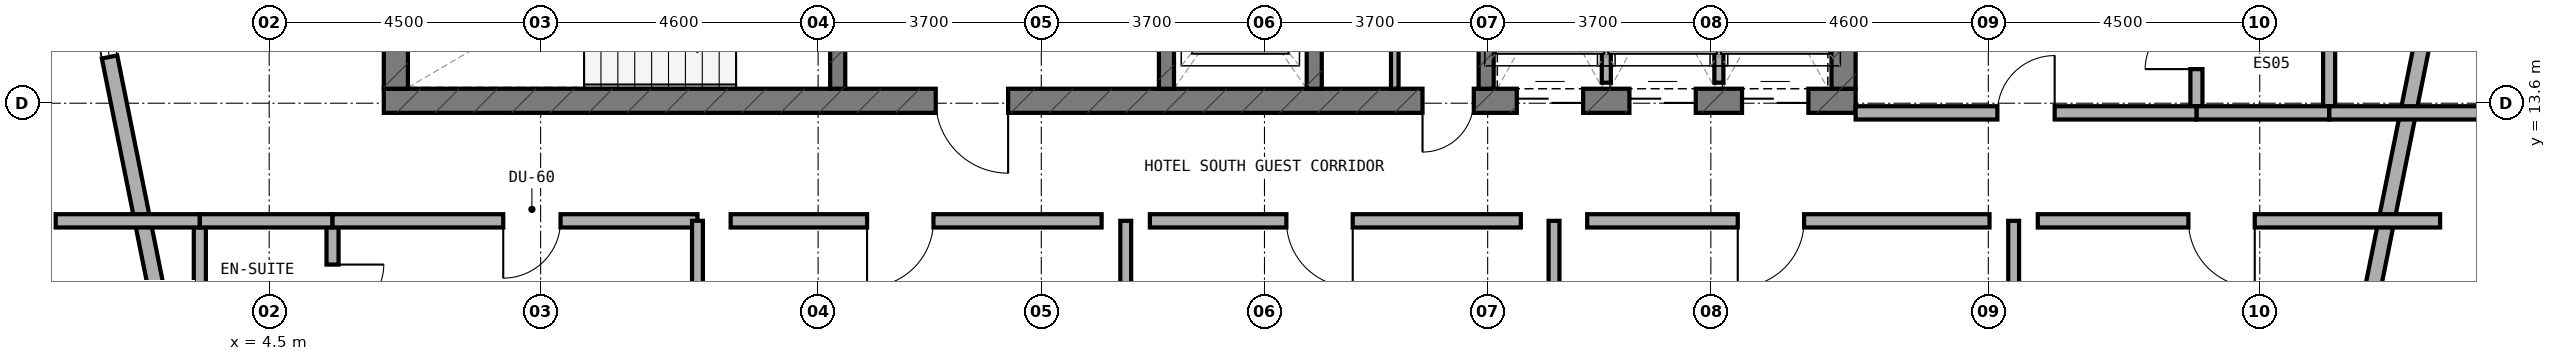
"""IFC4 building model, lengths in metres.
Left out: names, types, materials, properties, quantities, classifications, styles, units other than length and angle.
Written with IfcOpenShell. Run it as: python <this file> out.ifc"""

import sys

from ifc_helpers import new_model, si_unit, direction, frame, frame_2d, origin, place, context, subcontext, project, spatial, rectangle, extrude, element, fill, save


model = new_model("IFC4")
c1 = context("Model", 3, precision=1e-05, world=origin(), true_north=direction((0.0, 1.0)))
c2 = subcontext(c1, "Body", "Model", "MODEL_VIEW")
j1 = project(units=[si_unit("LENGTHUNIT", "METRE"), si_unit("PLANEANGLEUNIT", "RADIAN")], contexts=[c1])
p1 = place(None, origin())
s1 = spatial("IfcSite", under=j1, at=p1, CompositionType="ELEMENT")
p2 = place(p1, origin())
s2 = spatial("IfcBuilding", under=s1, at=p2, CompositionType="ELEMENT")
p3 = place(p2, frame((0.0, 0.0, 166.0)))
s3 = spatial("IfcBuildingStorey", under=s2, at=p3, CompositionType="ELEMENT", Elevation=166.0)
p4 = place(p3, frame((6.4, 13.64, 0.0), z_axis=(0.0, 0.0, 1.0), x_axis=(1.0, 0.0, 0.0)))
e1 = element("IfcWall", 1, at=p4, inside=s3, PredefinedType="SHEAR", context=c2, shape_type="SweptSolid", body=[
    extrude(rectangle(XDim=24.4, YDim=0.4, at=frame_2d((12.2, 0.0))), origin(), (0.0, 0.0, 1.0), 3.5),
])
p5 = place(p4, frame((9.15, 0.0, 0.0)))
e2 = element("IfcOpeningElement", 2, at=p5, cuts=e1, PredefinedType="OPENING", context=c2, shape_type="SweptSolid", body=[
    extrude(rectangle(XDim=1.2, YDim=2.15, at=frame_2d((0.6, 1.075))), frame((0.0, 0.21, 0.0), z_axis=(0.0, -1.0, 0.0), x_axis=(1.0, 0.0, 0.0)), (0.0, 0.0, 1.0), 0.42),
])
p6 = place(p4, frame((17.22, 0.0, 0.0)))
e3 = element("IfcOpeningElement", 3, at=p6, cuts=e1, PredefinedType="OPENING", context=c2, shape_type="SweptSolid", body=[
    extrude(rectangle(XDim=0.85, YDim=2.1, at=frame_2d((0.425, 1.05))), frame((0.0, 0.21, 0.0), z_axis=(0.0, -1.0, 0.0), x_axis=(1.0, 0.0, 0.0)), (0.0, 0.0, 1.0), 0.42),
])
p7 = place(p4, frame((18.783, 0.0, 0.0)))
e4 = element("IfcOpeningElement", 4, at=p7, cuts=e1, PredefinedType="OPENING", context=c2, shape_type="SweptSolid", body=[
    extrude(rectangle(XDim=1.1, YDim=2.15, at=frame_2d((0.55, 1.075))), frame((0.0, 0.21, 0.0), z_axis=(0.0, -1.0, 0.0), x_axis=(1.0, 0.0, 0.0)), (0.0, 0.0, 1.0), 0.42),
])
p8 = place(p4, frame((20.65, 0.0, 0.0)))
e5 = element("IfcOpeningElement", 5, at=p8, cuts=e1, PredefinedType="OPENING", context=c2, shape_type="SweptSolid", body=[
    extrude(rectangle(XDim=1.1, YDim=2.15, at=frame_2d((0.55, 1.075))), frame((0.0, 0.21, 0.0), z_axis=(0.0, -1.0, 0.0), x_axis=(1.0, 0.0, 0.0)), (0.0, 0.0, 1.0), 0.42),
])
p9 = place(p4, frame((22.517, 0.0, 0.0)))
e6 = element("IfcOpeningElement", 6, at=p9, cuts=e1, PredefinedType="OPENING", context=c2, shape_type="SweptSolid", body=[
    extrude(rectangle(XDim=1.1, YDim=2.15, at=frame_2d((0.55, 1.075))), frame((0.0, 0.21, 0.0), z_axis=(0.0, -1.0, 0.0), x_axis=(1.0, 0.0, 0.0)), (0.0, 0.0, 1.0), 0.42),
])
for number, where, z_axis, x_axis in (
    (7, (6.6, 13.84, 0.0), (0.0, 0.0, 1.0), (0.0, 1.0, 0.0)),
    (8, (30.6, 13.84, 0.0), (0.0, 0.0, 1.0), (0.0, 1.0, 0.0)),
):
    element("IfcWall", number, at=place(p3, frame(where, z_axis=z_axis, x_axis=x_axis)), inside=s3, PredefinedType="SHEAR", context=c2, shape_type="SweptSolid", body=[
        extrude(rectangle(XDim=3.16, YDim=0.4, at=frame_2d((1.58, 0.0))), origin(), (0.0, 0.0, 1.0), 3.5),
    ])
p10 = place(p3, frame((13.925, 13.84, 0.0), z_axis=(0.0, 0.0, 1.0), x_axis=(0.0, 1.0, 0.0)))
e9 = element("IfcWall", 9, at=p10, inside=s3, PredefinedType="STANDARD", context=c2, shape_type="SweptSolid", body=[
    extrude(rectangle(XDim=3.16, YDim=0.25, at=frame_2d((1.58, 0.0))), origin(), (0.0, 0.0, 1.0), 3.22),
])
p11 = place(p10, frame((0.98, 0.0, 0.0)))
e10 = element("IfcOpeningElement", 10, at=p11, cuts=e9, PredefinedType="OPENING", context=c2, shape_type="SweptSolid", body=[
    extrude(rectangle(XDim=1.1, YDim=2.15, at=frame_2d((0.55, 1.075))), frame((0.0, 0.135, 0.0), z_axis=(0.0, -1.0, 0.0), x_axis=(1.0, 0.0, 0.0)), (0.0, 0.0, 1.0), 0.27),
])
p12 = place(p3, frame((19.375, 13.84, 0.0), z_axis=(0.0, 0.0, 1.0), x_axis=(0.0, 1.0, 0.0)))
e11 = element("IfcWall", 11, at=p12, inside=s3, PredefinedType="STANDARD", context=c2, shape_type="SweptSolid", body=[
    extrude(rectangle(XDim=3.16, YDim=0.25, at=frame_2d((1.58, 0.0))), origin(), (0.0, 0.0, 1.0), 3.22),
])
p13 = place(p12, frame((0.98, 0.0, 0.0)))
e12 = element("IfcOpeningElement", 12, at=p13, cuts=e11, PredefinedType="OPENING", context=c2, shape_type="SweptSolid", body=[
    extrude(rectangle(XDim=1.1, YDim=2.15, at=frame_2d((0.55, 1.075))), frame((0.0, 0.135, 0.0), z_axis=(0.0, -1.0, 0.0), x_axis=(1.0, 0.0, 0.0)), (0.0, 0.0, 1.0), 0.27),
])
for number, where, z_axis, x_axis in (
    (13, (21.825, 13.84, 0.0), (0.0, 0.0, 1.0), (0.0, 1.0, 0.0)),
    (14, (24.675, 13.84, 0.0), (0.0, 0.0, 1.0), (0.0, 1.0, 0.0)),
):
    element("IfcWall", number, at=place(p3, frame(where, z_axis=z_axis, x_axis=x_axis)), inside=s3, PredefinedType="STANDARD", context=c2, shape_type="SweptSolid", body=[
        extrude(rectangle(XDim=3.16, YDim=0.25, at=frame_2d((1.58, 0.0))), origin(), (0.0, 0.0, 1.0), 3.22),
    ])
p14 = place(p3, frame((39.271, 10.018, 0.0), z_axis=(0.0, 0.0, 1.0), x_axis=(0.197435082048, 0.980315963543, 0.0)))
e15 = element("IfcWall", 15, at=p14, inside=s3, PredefinedType="STANDARD", context=c2, shape_type="SweptSolid", body=[
    extrude(rectangle(XDim=9.183, YDim=0.26, at=frame_2d((4.591, 0.0))), origin(), (0.0, 0.0, 1.0), 3.22),
])
p15 = place(p14, frame((5.349, 0.0, 0.85)))
e16 = element("IfcOpeningElement", 16, at=p15, cuts=e15, PredefinedType="OPENING", context=c2, shape_type="SweptSolid", body=[
    extrude(rectangle(XDim=2.1, YDim=1.5, at=frame_2d((1.05, 0.75))), frame((0.0, 0.14, 0.0), z_axis=(0.0, -1.0, 0.0), x_axis=(1.0, 0.0, 0.0)), (0.0, 0.0, 1.0), 0.28),
])
p16 = place(p3, frame((0.916, 19.02, 0.0), z_axis=(0.0, 0.0, 1.0), x_axis=(0.197435082048, -0.980315963543, 0.0)))
e17 = element("IfcWall", 17, at=p16, inside=s3, PredefinedType="STANDARD", context=c2, shape_type="SweptSolid", body=[
    extrude(rectangle(XDim=9.183, YDim=0.26, at=frame_2d((4.591, 0.0))), origin(), (0.0, 0.0, 1.0), 3.22),
])
p17 = place(p16, frame((2.647, 0.0, 0.85)))
e18 = element("IfcOpeningElement", 18, at=p17, cuts=e17, PredefinedType="OPENING", context=c2, shape_type="SweptSolid", body=[
    extrude(rectangle(XDim=2.1, YDim=1.5, at=frame_2d((1.05, 0.75))), frame((0.0, 0.14, 0.0), z_axis=(0.0, -1.0, 0.0), x_axis=(1.0, 0.0, 0.0)), (0.0, 0.0, 1.0), 0.28),
])
p18 = place(p3, frame((23.16, 13.84, 0.0), z_axis=(0.0, 0.0, 1.0), x_axis=(0.0, 1.0, 0.0)))
e19 = element("IfcWall", 19, at=p18, inside=s3, PredefinedType="PARTITIONING", context=c2, shape_type="SweptSolid", body=[
    extrude(rectangle(XDim=1.34, YDim=0.125, at=frame_2d((0.67, 0.0))), origin(), (0.0, 0.0, 1.0), 3.22),
])
p19 = place(p3, frame((26.667, 13.94, 0.0), z_axis=(0.0, 0.0, 1.0), x_axis=(0.0, 1.0, 0.0)))
e20 = element("IfcWall", 20, at=p19, inside=s3, PredefinedType="PARTITIONING", context=c2, shape_type="SweptSolid", body=[
    extrude(rectangle(XDim=2.96, YDim=0.15, at=frame_2d((1.48, 0.0))), origin(), (0.0, 0.0, 1.0), 3.22),
])
p20 = place(p3, frame((28.533, 13.94, 0.0), z_axis=(0.0, 0.0, 1.0), x_axis=(0.0, 1.0, 0.0)))
e21 = element("IfcWall", 21, at=p20, inside=s3, PredefinedType="PARTITIONING", context=c2, shape_type="SweptSolid", body=[
    extrude(rectangle(XDim=2.96, YDim=0.15, at=frame_2d((1.48, 0.0))), origin(), (0.0, 0.0, 1.0), 2.795),
])
p21 = place(p3, frame((5.55, 9.45, 0.0), z_axis=(0.0, 0.0, 1.0), x_axis=(0.0, 1.0, 0.0)))
e22 = element("IfcWall", 22, at=p21, inside=s3, PredefinedType="PLUMBINGWALL", context=c2, shape_type="SweptSolid", body=[
    extrude(rectangle(XDim=2.1, YDim=0.2, at=frame_2d((1.05, 0.0))), origin(), (0.0, 0.0, 1.0), 3.22),
])
p22 = place(p21, frame((0.625, 0.0, 0.0)))
e23 = element("IfcOpeningElement", 23, at=p22, cuts=e22, PredefinedType="OPENING", context=c2, shape_type="SweptSolid", body=[
    extrude(rectangle(XDim=0.85, YDim=2.1, at=frame_2d((0.425, 1.05))), frame((0.0, 0.11, 0.0), z_axis=(0.0, -1.0, 0.0), x_axis=(1.0, 0.0, 0.0)), (0.0, 0.0, 1.0), 0.22),
])
p23 = place(p3, frame((3.35, 9.45, 0.0), z_axis=(0.0, 0.0, 1.0), x_axis=(0.0, 1.0, 0.0)))
e24 = element("IfcWall", 24, at=p23, inside=s3, PredefinedType="PLUMBINGWALL", context=c2, shape_type="SweptSolid", body=[
    extrude(rectangle(XDim=2.1, YDim=0.2, at=frame_2d((1.05, 0.0))), origin(), (0.0, 0.0, 1.0), 3.22),
])
p24 = place(p3, frame((0.96, 11.65, 0.0), z_axis=(0.0, 0.0, 1.0), x_axis=(1.0, 0.0, 0.0)))
e25 = element("IfcWall", 25, at=p24, inside=s3, PredefinedType="SOLIDWALL", context=c2, shape_type="SweptSolid", body=[
    extrude(rectangle(XDim=2.39, YDim=0.22, at=frame_2d((1.195, 0.0))), origin(), (0.0, 0.0, 1.0), 3.22),
])
p25 = place(p3, frame((3.35, 11.65, 0.0), z_axis=(0.0, 0.0, 1.0), x_axis=(1.0, 0.0, 0.0)))
e26 = element("IfcWall", 26, at=p25, inside=s3, PredefinedType="SOLIDWALL", context=c2, shape_type="SweptSolid", body=[
    extrude(rectangle(XDim=2.2, YDim=0.22, at=frame_2d((1.1, 0.0))), origin(), (0.0, 0.0, 1.0), 3.22),
])
p26 = place(p3, frame((5.55, 11.65, 0.0), z_axis=(0.0, 0.0, 1.0), x_axis=(1.0, 0.0, 0.0)))
e27 = element("IfcWall", 27, at=p26, inside=s3, PredefinedType="SOLIDWALL", context=c2, shape_type="SweptSolid", body=[
    extrude(rectangle(XDim=6.05, YDim=0.22, at=frame_2d((3.025, 0.0))), origin(), (0.0, 0.0, 1.0), 2.795),
])
p27 = place(p26, frame((2.83, 0.0, 0.0)))
e28 = element("IfcOpeningElement", 28, at=p27, cuts=e27, PredefinedType="OPENING", context=c2, shape_type="SweptSolid", body=[
    extrude(rectangle(XDim=0.95, YDim=2.1, at=frame_2d((0.475, 1.05))), frame((0.0, 0.12, 0.0), z_axis=(0.0, -1.0, 0.0), x_axis=(1.0, 0.0, 0.0)), (0.0, 0.0, 1.0), 0.24),
])
p28 = place(p3, frame((11.6, 5.534, 0.0), z_axis=(0.0, 0.0, 1.0), x_axis=(0.0, 1.0, 0.0)))
e29 = element("IfcWall", 29, at=p28, inside=s3, PredefinedType="SOLIDWALL", context=c2, shape_type="SweptSolid", body=[
    extrude(rectangle(XDim=6.116, YDim=0.18, at=frame_2d((3.058, 0.0))), origin(), (0.0, 0.0, 1.0), 2.835),
])
p29 = place(p3, frame((18.7, 4.86, 0.0), z_axis=(0.0, 0.0, 1.0), x_axis=(0.0, 1.0, 0.0)))
e30 = element("IfcWall", 30, at=p29, inside=s3, PredefinedType="SOLIDWALL", context=c2, shape_type="SweptSolid", body=[
    extrude(rectangle(XDim=6.79, YDim=0.18, at=frame_2d((3.395, 0.0))), origin(), (0.0, 0.0, 1.0), 2.835),
])
p30 = place(p3, frame((12.15, 11.65, 0.0), z_axis=(0.0, 0.0, 1.0), x_axis=(1.0, 0.0, 0.0)))
e31 = element("IfcWall", 31, at=p30, inside=s3, PredefinedType="SOLIDWALL", context=c2, shape_type="SweptSolid", body=[
    extrude(rectangle(XDim=6.15, YDim=0.22, at=frame_2d((3.075, 0.0))), origin(), (0.0, 0.0, 1.0), 2.795),
])
p31 = place(p30, frame((2.262, 0.0, 0.0)))
e32 = element("IfcOpeningElement", 32, at=p31, cuts=e31, PredefinedType="OPENING", context=c2, shape_type="SweptSolid", body=[
    extrude(rectangle(XDim=1.1, YDim=2.1, at=frame_2d((0.55, 1.05))), frame((0.0, 0.12, 0.0), z_axis=(0.0, -1.0, 0.0), x_axis=(1.0, 0.0, 0.0)), (0.0, 0.0, 1.0), 0.24),
])
p32 = place(p3, frame((19.1, 11.65, 0.0), z_axis=(0.0, 0.0, 1.0), x_axis=(1.0, 0.0, 0.0)))
e33 = element("IfcWall", 33, at=p32, inside=s3, PredefinedType="SOLIDWALL", context=c2, shape_type="SweptSolid", body=[
    extrude(rectangle(XDim=6.15, YDim=0.22, at=frame_2d((3.075, 0.0))), origin(), (0.0, 0.0, 1.0), 3.22),
])
p33 = place(p32, frame((2.263, 0.0, 0.0)))
e34 = element("IfcOpeningElement", 34, at=p33, cuts=e33, PredefinedType="OPENING", context=c2, shape_type="SweptSolid", body=[
    extrude(rectangle(XDim=1.1, YDim=2.1, at=frame_2d((0.55, 1.05))), frame((0.0, 0.12, 0.0), z_axis=(0.0, -1.0, 0.0), x_axis=(1.0, 0.0, 0.0)), (0.0, 0.0, 1.0), 0.24),
])
p34 = place(p3, frame((25.8, 4.86, 0.0), z_axis=(0.0, 0.0, 1.0), x_axis=(0.0, 1.0, 0.0)))
e35 = element("IfcWall", 35, at=p34, inside=s3, PredefinedType="SOLIDWALL", context=c2, shape_type="SweptSolid", body=[
    extrude(rectangle(XDim=6.79, YDim=0.18, at=frame_2d((3.395, 0.0))), origin(), (0.0, 0.0, 1.0), 2.795),
])
p35 = place(p3, frame((33.42, 6.142, 0.0), z_axis=(0.0, 0.0, 1.0), x_axis=(0.0, 1.0, 0.0)))
e36 = element("IfcWall", 36, at=p35, inside=s3, PredefinedType="SOLIDWALL", context=c2, shape_type="SweptSolid", body=[
    extrude(rectangle(XDim=5.508, YDim=0.18, at=frame_2d((2.754, 0.0))), origin(), (0.0, 0.0, 1.0), 2.835),
])
p36 = place(p3, frame((26.35, 11.65, 0.0), z_axis=(0.0, 0.0, 1.0), x_axis=(1.0, 0.0, 0.0)))
e37 = element("IfcWall", 37, at=p36, inside=s3, PredefinedType="SOLIDWALL", context=c2, shape_type="SweptSolid", body=[
    extrude(rectangle(XDim=6.67, YDim=0.22, at=frame_2d((3.335, 0.0))), origin(), (0.0, 0.0, 1.0), 2.795),
])
p37 = place(p36, frame((2.496, 0.0, 0.0)))
e38 = element("IfcOpeningElement", 38, at=p37, cuts=e37, PredefinedType="OPENING", context=c2, shape_type="SweptSolid", body=[
    extrude(rectangle(XDim=1.1, YDim=2.1, at=frame_2d((0.55, 1.05))), frame((0.0, 0.12, 0.0), z_axis=(0.0, -1.0, 0.0), x_axis=(1.0, 0.0, 0.0)), (0.0, 0.0, 1.0), 0.24),
])
p38 = place(p3, frame((33.82, 11.65, 0.0), z_axis=(0.0, 0.0, 1.0), x_axis=(1.0, 0.0, 0.0)))
e39 = element("IfcWall", 39, at=p38, inside=s3, PredefinedType="SOLIDWALL", context=c2, shape_type="SweptSolid", body=[
    extrude(rectangle(XDim=6.67, YDim=0.22, at=frame_2d((3.335, 0.0))), origin(), (0.0, 0.0, 1.0), 2.795),
])
p39 = place(p38, frame((2.497, 0.0, 0.0)))
e40 = element("IfcOpeningElement", 40, at=p39, cuts=e39, PredefinedType="OPENING", context=c2, shape_type="SweptSolid", body=[
    extrude(rectangle(XDim=1.1, YDim=2.1, at=frame_2d((0.55, 1.05))), frame((0.0, 0.12, 0.0), z_axis=(0.0, -1.0, 0.0), x_axis=(1.0, 0.0, 0.0)), (0.0, 0.0, 1.0), 0.24),
])
p40 = place(p3, frame((36.45, 13.54, 0.0), z_axis=(0.0, 0.0, 1.0), x_axis=(0.0, 1.0, 0.0)))
e41 = element("IfcWall", 41, at=p40, inside=s3, PredefinedType="PLUMBINGWALL", context=c2, shape_type="SweptSolid", body=[
    extrude(rectangle(XDim=2.1, YDim=0.2, at=frame_2d((1.05, 0.0))), origin(), (0.0, 0.0, 1.0), 3.22),
])
p41 = place(p40, frame((0.625, 0.0, 0.0)))
e42 = element("IfcOpeningElement", 42, at=p41, cuts=e41, PredefinedType="OPENING", context=c2, shape_type="SweptSolid", body=[
    extrude(rectangle(XDim=0.85, YDim=2.1, at=frame_2d((0.425, 1.05))), frame((0.0, 0.11, 0.0), z_axis=(0.0, -1.0, 0.0), x_axis=(1.0, 0.0, 0.0)), (0.0, 0.0, 1.0), 0.22),
])
p42 = place(p3, frame((38.65, 13.54, 0.0), z_axis=(0.0, 0.0, 1.0), x_axis=(0.0, 1.0, 0.0)))
e43 = element("IfcWall", 43, at=p42, inside=s3, PredefinedType="PLUMBINGWALL", context=c2, shape_type="SweptSolid", body=[
    extrude(rectangle(XDim=2.1, YDim=0.2, at=frame_2d((1.05, 0.0))), origin(), (0.0, 0.0, 1.0), 3.22),
])
p43 = place(p3, frame((38.65, 13.44, 0.0), z_axis=(0.0, 0.0, 1.0), x_axis=(1.0, 0.0, 0.0)))
e44 = element("IfcWall", 44, at=p43, inside=s3, PredefinedType="SOLIDWALL", context=c2, shape_type="SweptSolid", body=[
    extrude(rectangle(XDim=2.55, YDim=0.22, at=frame_2d((1.275, 0.0))), origin(), (0.0, 0.0, 1.0), 3.22),
])
p44 = place(p3, frame((36.45, 13.44, 0.0), z_axis=(0.0, 0.0, 1.0), x_axis=(1.0, 0.0, 0.0)))
e45 = element("IfcWall", 45, at=p44, inside=s3, PredefinedType="SOLIDWALL", context=c2, shape_type="SweptSolid", body=[
    extrude(rectangle(XDim=2.2, YDim=0.22, at=frame_2d((1.1, 0.0))), origin(), (0.0, 0.0, 1.0), 3.22),
])
p45 = place(p3, frame((30.8, 13.44, 0.0), z_axis=(0.0, 0.0, 1.0), x_axis=(1.0, 0.0, 0.0)))
e46 = element("IfcWall", 46, at=p45, inside=s3, PredefinedType="SOLIDWALL", context=c2, shape_type="SweptSolid", body=[
    extrude(rectangle(XDim=5.65, YDim=0.22, at=frame_2d((2.825, 0.0))), origin(), (0.0, 0.0, 1.0), 2.795),
])
p46 = place(p45, frame((2.35, 0.0, 0.0)))
e47 = element("IfcOpeningElement", 47, at=p46, cuts=e46, PredefinedType="OPENING", context=c2, shape_type="SweptSolid", body=[
    extrude(rectangle(XDim=0.95, YDim=2.1, at=frame_2d((0.475, 1.05))), frame((0.0, 0.12, 0.0), z_axis=(0.0, -1.0, 0.0), x_axis=(1.0, 0.0, 0.0)), (0.0, 0.0, 1.0), 0.24),
])
p47 = place(p17, origin())
e48 = element("IfcWindow", 48, at=p47, inside=s3, PartitioningType="SINGLE_PANEL", PredefinedType="WINDOW", context=c2, shape_type="SweptSolid", body=[
    extrude(rectangle(XDim=2.1, YDim=1.5, at=frame_2d((1.05, 0.75))), frame((0.0, 0.03, 0.0), z_axis=(0.0, -1.0, 0.0), x_axis=(1.0, 0.0, 0.0)), (0.0, 0.0, 1.0), 0.06),
])
fill(e18, e48)
p48 = place(p5, frame((1.2, 0.0, 0.0), z_axis=(0.0, 0.0, 1.0), x_axis=(-1.0, 0.0, 0.0)))
e49 = element("IfcDoor", 49, at=p48, inside=s3, OperationType="SINGLE_SWING_LEFT", PredefinedType="DOOR", context=c2, shape_type="SweptSolid", body=[
    extrude(rectangle(XDim=1.2, YDim=2.15, at=frame_2d((0.6, 1.075))), frame((0.0, 0.025, 0.0), z_axis=(0.0, -1.0, 0.0), x_axis=(1.0, 0.0, 0.0)), (0.0, 0.0, 1.0), 0.05),
])
fill(e2, e49)
p49 = place(p6, frame((0.85, 0.0, 0.0), z_axis=(0.0, 0.0, 1.0), x_axis=(-1.0, 0.0, 0.0)))
e50 = element("IfcDoor", 50, at=p49, inside=s3, OperationType="SINGLE_SWING_RIGHT", PredefinedType="DOOR", context=c2, shape_type="SweptSolid", body=[
    extrude(rectangle(XDim=0.85, YDim=2.1, at=frame_2d((0.425, 1.05))), frame((0.0, 0.025, 0.0), z_axis=(0.0, -1.0, 0.0), x_axis=(1.0, 0.0, 0.0)), (0.0, 0.0, 1.0), 0.05),
])
fill(e3, e50)
p50 = place(p7, frame((1.1, 0.0, 0.0), z_axis=(0.0, 0.0, 1.0), x_axis=(-1.0, 0.0, 0.0)))
e51 = element("IfcDoor", 51, at=p50, inside=s3, OperationType="DOUBLE_DOOR_SLIDING", PredefinedType="DOOR", context=c2, shape_type="SweptSolid", body=[
    extrude(rectangle(XDim=1.1, YDim=2.15, at=frame_2d((0.55, 1.075))), frame((0.0, 0.025, 0.0), z_axis=(0.0, -1.0, 0.0), x_axis=(1.0, 0.0, 0.0)), (0.0, 0.0, 1.0), 0.05),
])
fill(e4, e51)
p51 = place(p8, frame((1.1, 0.0, 0.0), z_axis=(0.0, 0.0, 1.0), x_axis=(-1.0, 0.0, 0.0)))
e52 = element("IfcDoor", 52, at=p51, inside=s3, OperationType="DOUBLE_DOOR_SLIDING", PredefinedType="DOOR", context=c2, shape_type="SweptSolid", body=[
    extrude(rectangle(XDim=1.1, YDim=2.15, at=frame_2d((0.55, 1.075))), frame((0.0, 0.025, 0.0), z_axis=(0.0, -1.0, 0.0), x_axis=(1.0, 0.0, 0.0)), (0.0, 0.0, 1.0), 0.05),
])
fill(e5, e52)
p52 = place(p9, frame((1.1, 0.0, 0.0), z_axis=(0.0, 0.0, 1.0), x_axis=(-1.0, 0.0, 0.0)))
e53 = element("IfcDoor", 53, at=p52, inside=s3, OperationType="DOUBLE_DOOR_SLIDING", PredefinedType="DOOR", context=c2, shape_type="SweptSolid", body=[
    extrude(rectangle(XDim=1.1, YDim=2.15, at=frame_2d((0.55, 1.075))), frame((0.0, 0.025, 0.0), z_axis=(0.0, -1.0, 0.0), x_axis=(1.0, 0.0, 0.0)), (0.0, 0.0, 1.0), 0.05),
])
fill(e6, e53)
p53 = place(p22, frame((0.85, 0.0, 0.0), z_axis=(0.0, 0.0, 1.0), x_axis=(-1.0, 0.0, 0.0)))
e54 = element("IfcDoor", 54, at=p53, inside=s3, OperationType="SINGLE_SWING_LEFT", PredefinedType="DOOR", context=c2, shape_type="SweptSolid", body=[
    extrude(rectangle(XDim=0.85, YDim=2.1, at=frame_2d((0.425, 1.05))), frame((0.0, 0.025, 0.0), z_axis=(0.0, -1.0, 0.0), x_axis=(1.0, 0.0, 0.0)), (0.0, 0.0, 1.0), 0.05),
])
fill(e23, e54)
p54 = place(p27, frame((0.95, 0.0, 0.0), z_axis=(0.0, 0.0, 1.0), x_axis=(-1.0, 0.0, 0.0)))
e55 = element("IfcDoor", 55, at=p54, inside=s3, OperationType="SINGLE_SWING_RIGHT", PredefinedType="DOOR", context=c2, shape_type="SweptSolid", body=[
    extrude(rectangle(XDim=0.95, YDim=2.1, at=frame_2d((0.475, 1.05))), frame((0.0, 0.025, 0.0), z_axis=(0.0, -1.0, 0.0), x_axis=(1.0, 0.0, 0.0)), (0.0, 0.0, 1.0), 0.05),
])
fill(e28, e55)
p55 = place(p31, frame((1.1, 0.0, 0.0), z_axis=(0.0, 0.0, 1.0), x_axis=(-1.0, 0.0, 0.0)))
e56 = element("IfcDoor", 56, at=p55, inside=s3, OperationType="SINGLE_SWING_RIGHT", PredefinedType="DOOR", context=c2, shape_type="SweptSolid", body=[
    extrude(rectangle(XDim=1.1, YDim=2.1, at=frame_2d((0.55, 1.05))), frame((0.0, 0.025, 0.0), z_axis=(0.0, -1.0, 0.0), x_axis=(1.0, 0.0, 0.0)), (0.0, 0.0, 1.0), 0.05),
])
fill(e32, e56)
p56 = place(p33, frame((1.1, 0.0, 0.0), z_axis=(0.0, 0.0, 1.0), x_axis=(-1.0, 0.0, 0.0)))
e57 = element("IfcDoor", 57, at=p56, inside=s3, OperationType="SINGLE_SWING_LEFT", PredefinedType="DOOR", context=c2, shape_type="SweptSolid", body=[
    extrude(rectangle(XDim=1.1, YDim=2.1, at=frame_2d((0.55, 1.05))), frame((0.0, 0.025, 0.0), z_axis=(0.0, -1.0, 0.0), x_axis=(1.0, 0.0, 0.0)), (0.0, 0.0, 1.0), 0.05),
])
fill(e34, e57)
p57 = place(p37, frame((1.1, 0.0, 0.0), z_axis=(0.0, 0.0, 1.0), x_axis=(-1.0, 0.0, 0.0)))
e58 = element("IfcDoor", 58, at=p57, inside=s3, OperationType="SINGLE_SWING_RIGHT", PredefinedType="DOOR", context=c2, shape_type="SweptSolid", body=[
    extrude(rectangle(XDim=1.1, YDim=2.1, at=frame_2d((0.55, 1.05))), frame((0.0, 0.025, 0.0), z_axis=(0.0, -1.0, 0.0), x_axis=(1.0, 0.0, 0.0)), (0.0, 0.0, 1.0), 0.05),
])
fill(e38, e58)
p58 = place(p39, frame((1.1, 0.0, 0.0), z_axis=(0.0, 0.0, 1.0), x_axis=(-1.0, 0.0, 0.0)))
e59 = element("IfcDoor", 59, at=p58, inside=s3, OperationType="SINGLE_SWING_LEFT", PredefinedType="DOOR", context=c2, shape_type="SweptSolid", body=[
    extrude(rectangle(XDim=1.1, YDim=2.1, at=frame_2d((0.55, 1.05))), frame((0.0, 0.025, 0.0), z_axis=(0.0, -1.0, 0.0), x_axis=(1.0, 0.0, 0.0)), (0.0, 0.0, 1.0), 0.05),
])
fill(e40, e59)
p59 = place(p41, origin())
e60 = element("IfcDoor", 60, at=p59, inside=s3, OperationType="SINGLE_SWING_LEFT", PredefinedType="DOOR", context=c2, shape_type="SweptSolid", body=[
    extrude(rectangle(XDim=0.85, YDim=2.1, at=frame_2d((0.425, 1.05))), frame((0.0, 0.025, 0.0), z_axis=(0.0, -1.0, 0.0), x_axis=(1.0, 0.0, 0.0)), (0.0, 0.0, 1.0), 0.05),
])
fill(e42, e60)
p60 = place(p46, origin())
e61 = element("IfcDoor", 61, at=p60, inside=s3, OperationType="SINGLE_SWING_RIGHT", PredefinedType="DOOR", context=c2, shape_type="SweptSolid", body=[
    extrude(rectangle(XDim=0.95, YDim=2.1, at=frame_2d((0.475, 1.05))), frame((0.0, 0.025, 0.0), z_axis=(0.0, -1.0, 0.0), x_axis=(1.0, 0.0, 0.0)), (0.0, 0.0, 1.0), 0.05),
])
fill(e47, e61)
save(model, sys.argv[1])
